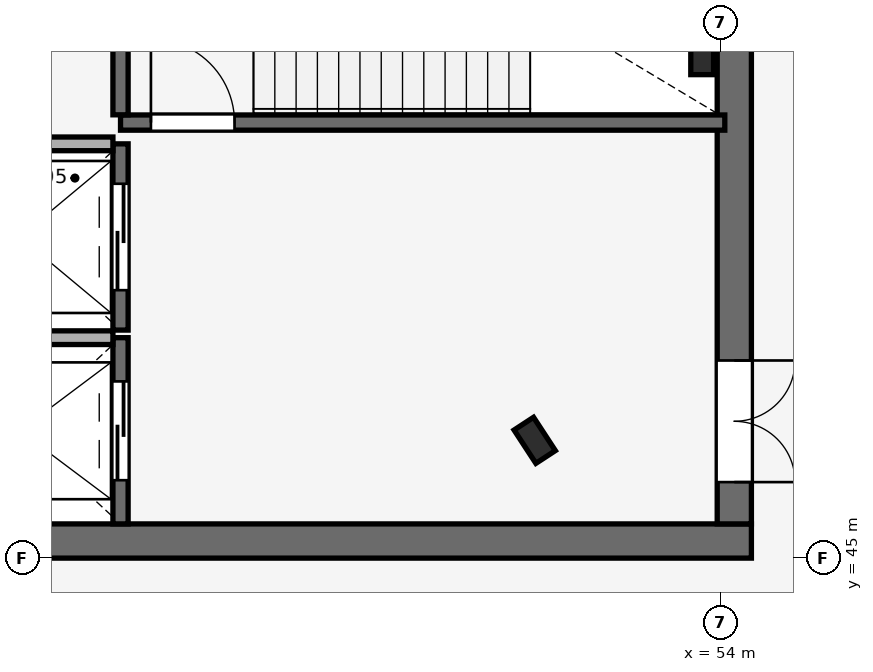
"""IFC4 building model, lengths in metres.
Left out: names, types, materials, properties, quantities, classifications, styles, units other than length and angle.
Written with IfcOpenShell. Run it as: python <this file> out.ifc"""

import sys

from ifc_helpers import new_model, si_unit, direction, frame, frame_2d, origin, origin_2d, place, context, subcontext, project, spatial, rectangle, i_section, extrude, element, fill, save


model = new_model("IFC4")
c1 = context("Model", 3, precision=1e-05, world=origin(), true_north=direction((0.0, 1.0)))
c2 = subcontext(c1, "Body", "Model", "MODEL_VIEW")
j1 = project(units=[si_unit("LENGTHUNIT", "METRE"), si_unit("PLANEANGLEUNIT", "RADIAN")], contexts=[c1])
p1 = place(None, origin())
s1 = spatial("IfcSite", under=j1, at=p1, CompositionType="ELEMENT")
p2 = place(p1, origin())
s2 = spatial("IfcBuilding", under=s1, at=p2, CompositionType="ELEMENT")
p3 = place(p2, frame((0.0, 0.0, 5.4)))
s3 = spatial("IfcBuildingStorey", under=s2, at=p3, CompositionType="ELEMENT", Elevation=5.4)
p4 = place(p3, frame((51.549, 46.55, 0.0), z_axis=(0.0, 0.0, 1.0), x_axis=(-0.836955398099, -0.547271104292, 0.0)))
e1 = element("IfcColumn", 1, at=p4, inside=s3, PredefinedType="COLUMN", context=c2, shape_type="SweptSolid", body=[
    extrude(i_section(OverallWidth=0.306, OverallDepth=0.524, WebThickness=0.021, FlangeThickness=0.04, FilletRadius=0.027, at=origin_2d()), origin(), (0.0, 0.0, 1.0), 4.8),
])
p5 = place(p3, frame((43.0, 45.225, 0.0), z_axis=(0.0, 0.0, 1.0), x_axis=(1.0, 0.0, 0.0)))
e2 = element("IfcWall", 2, at=p5, inside=s3, PredefinedType="SHEAR", context=c2, shape_type="SweptSolid", body=[
    extrude(rectangle(XDim=11.4, YDim=0.45, at=frame_2d((5.7, 0.0))), origin(), (0.0, 0.0, 1.0), 4.8),
])
p6 = place(p3, frame((54.175, 45.45, 0.0), z_axis=(0.0, 0.0, 1.0), x_axis=(0.0, 1.0, 0.0)))
e3 = element("IfcWall", 3, at=p6, inside=s3, PredefinedType="SHEAR", context=c2, shape_type="SweptSolid", body=[
    extrude(rectangle(XDim=9.1, YDim=0.45, at=frame_2d((4.55, 0.0))), origin(), (0.0, 0.0, 1.0), 4.8),
])
p7 = place(p6, frame((0.55, 0.0, 0.0)))
e4 = element("IfcOpeningElement", 4, at=p7, cuts=e3, PredefinedType="OPENING", context=c2, shape_type="SweptSolid", body=[
    extrude(rectangle(XDim=1.6, YDim=2.2, at=frame_2d((0.8, 1.1))), frame((0.0, 0.235, 0.0), z_axis=(0.0, -1.0, 0.0), x_axis=(1.0, 0.0, 0.0)), (0.0, 0.0, 1.0), 0.47),
])
p8 = place(p3, frame((53.752, 51.611, 0.0), z_axis=(0.0, 0.0, 1.0), x_axis=(1.0, 0.0, 0.0)))
e5 = element("IfcColumn", 5, at=p8, inside=s3, PredefinedType="COLUMN", context=c2, shape_type="SweptSolid", body=[
    extrude(i_section(OverallWidth=0.3, OverallDepth=0.5, WebThickness=0.014, FlangeThickness=0.028, FilletRadius=0.027, at=origin_2d()), origin(), (0.0, 0.0, 1.0), 4.8),
])
p9 = place(p3, frame((46.1, 45.45, 0.0), z_axis=(0.0, 0.0, 1.0), x_axis=(0.0, 1.0, 0.0)))
e6 = element("IfcWall", 6, at=p9, inside=s3, PredefinedType="SHEAR", context=c2, shape_type="SweptSolid", body=[
    extrude(rectangle(XDim=2.45, YDim=0.2, at=frame_2d((1.225, 0.0))), origin(), (0.0, 0.0, 1.0), 4.52),
])
p10 = place(p9, frame((0.575, 0.0, 0.0)))
e7 = element("IfcOpeningElement", 7, at=p10, cuts=e6, PredefinedType="OPENING", context=c2, shape_type="SweptSolid", body=[
    extrude(rectangle(XDim=1.3, YDim=2.2, at=frame_2d((0.65, 1.1))), frame((0.0, 0.11, 0.0), z_axis=(0.0, -1.0, 0.0), x_axis=(1.0, 0.0, 0.0)), (0.0, 0.0, 1.0), 0.22),
])
p11 = place(p3, frame((43.55, 47.9, 0.0), z_axis=(0.0, 0.0, 1.0), x_axis=(1.0, 0.0, 0.0)))
e8 = element("IfcWall", 8, at=p11, inside=s3, PredefinedType="PARTITIONING", context=c2, shape_type="SweptSolid", body=[
    extrude(rectangle(XDim=2.45, YDim=0.18, at=frame_2d((1.225, 0.0))), origin(), (0.0, 0.0, 1.0), 4.8),
])
p12 = place(p3, frame((46.1, 48.0, 0.0), z_axis=(0.0, 0.0, 1.0), x_axis=(0.0, 1.0, 0.0)))
e9 = element("IfcWall", 9, at=p12, inside=s3, PredefinedType="SHEAR", context=c2, shape_type="SweptSolid", body=[
    extrude(rectangle(XDim=2.45, YDim=0.2, at=frame_2d((1.225, 0.0))), origin(), (0.0, 0.0, 1.0), 4.52),
])
p13 = place(p12, frame((0.525, 0.0, 0.0)))
e10 = element("IfcOpeningElement", 10, at=p13, cuts=e9, PredefinedType="OPENING", context=c2, shape_type="SweptSolid", body=[
    extrude(rectangle(XDim=1.4, YDim=2.2, at=frame_2d((0.7, 1.1))), frame((0.0, 0.11, 0.0), z_axis=(0.0, -1.0, 0.0), x_axis=(1.0, 0.0, 0.0)), (0.0, 0.0, 1.0), 0.22),
])
p14 = place(p3, frame((43.55, 50.45, 0.0), z_axis=(0.0, 0.0, 1.0), x_axis=(1.0, 0.0, 0.0)))
e11 = element("IfcWall", 11, at=p14, inside=s3, PredefinedType="PARTITIONING", context=c2, shape_type="SweptSolid", body=[
    extrude(rectangle(XDim=2.45, YDim=0.18, at=frame_2d((1.225, 0.0))), origin(), (0.0, 0.0, 1.0), 4.8),
])
p15 = place(p3, frame((46.1, 50.73, 0.0), z_axis=(0.0, 0.0, 1.0), x_axis=(1.0, 0.0, 0.0)))
e12 = element("IfcWall", 12, at=p15, inside=s3, PredefinedType="SHEAR", context=c2, shape_type="SweptSolid", body=[
    extrude(rectangle(XDim=7.95, YDim=0.2, at=frame_2d((3.975, 0.0))), origin(), (0.0, 0.0, 1.0), 4.8),
])
p16 = place(p15, frame((0.4, 0.0, 0.0)))
e13 = element("IfcOpeningElement", 13, at=p16, cuts=e12, PredefinedType="OPENING", context=c2, shape_type="SweptSolid", body=[
    extrude(rectangle(XDim=1.1, YDim=2.15, at=frame_2d((0.55, 1.075))), frame((0.0, 0.11, 0.0), z_axis=(0.0, -1.0, 0.0), x_axis=(1.0, 0.0, 0.0)), (0.0, 0.0, 1.0), 0.22),
])
p17 = place(p3, frame((46.1, 50.832, 0.0), z_axis=(0.0, 0.0, 1.0), x_axis=(0.0, 1.0, 0.0)))
e14 = element("IfcWall", 14, at=p17, inside=s3, PredefinedType="SHEAR", context=c2, shape_type="SweptSolid", body=[
    extrude(rectangle(XDim=3.686, YDim=0.2, at=frame_2d((1.843, 0.0))), origin(), (0.0, 0.0, 1.0), 4.8),
])
p18 = place(p10, origin())
e15 = element("IfcDoor", 15, at=p18, inside=s3, OperationType="DOUBLE_DOOR_SLIDING", PredefinedType="DOOR", context=c2, shape_type="SweptSolid", body=[
    extrude(rectangle(XDim=1.3, YDim=2.2, at=frame_2d((0.65, 1.1))), frame((0.0, 0.025, 0.0), z_axis=(0.0, -1.0, 0.0), x_axis=(1.0, 0.0, 0.0)), (0.0, 0.0, 1.0), 0.05),
])
fill(e7, e15)
p19 = place(p13, origin())
e16 = element("IfcDoor", 16, at=p19, inside=s3, OperationType="DOUBLE_DOOR_SLIDING", PredefinedType="DOOR", context=c2, shape_type="SweptSolid", body=[
    extrude(rectangle(XDim=1.4, YDim=2.2, at=frame_2d((0.7, 1.1))), frame((0.0, 0.025, 0.0), z_axis=(0.0, -1.0, 0.0), x_axis=(1.0, 0.0, 0.0)), (0.0, 0.0, 1.0), 0.05),
])
fill(e10, e16)
p20 = place(p16, frame((1.1, 0.0, 0.0), z_axis=(0.0, 0.0, 1.0), x_axis=(-1.0, 0.0, 0.0)))
e17 = element("IfcDoor", 17, at=p20, inside=s3, OperationType="SINGLE_SWING_RIGHT", PredefinedType="DOOR", context=c2, shape_type="SweptSolid", body=[
    extrude(rectangle(XDim=1.1, YDim=2.15, at=frame_2d((0.55, 1.075))), frame((0.0, 0.025, 0.0), z_axis=(0.0, -1.0, 0.0), x_axis=(1.0, 0.0, 0.0)), (0.0, 0.0, 1.0), 0.05),
])
fill(e13, e17)
p21 = place(p7, frame((1.6, 0.0, 0.0), z_axis=(0.0, 0.0, 1.0), x_axis=(-1.0, 0.0, 0.0)))
e18 = element("IfcDoor", 18, at=p21, inside=s3, OperationType="DOUBLE_DOOR_SINGLE_SWING", PredefinedType="DOOR", context=c2, shape_type="SweptSolid", body=[
    extrude(rectangle(XDim=1.6, YDim=2.2, at=frame_2d((0.8, 1.1))), frame((0.0, 0.025, 0.0), z_axis=(0.0, -1.0, 0.0), x_axis=(1.0, 0.0, 0.0)), (0.0, 0.0, 1.0), 0.05),
])
fill(e4, e18)
save(model, sys.argv[1])
